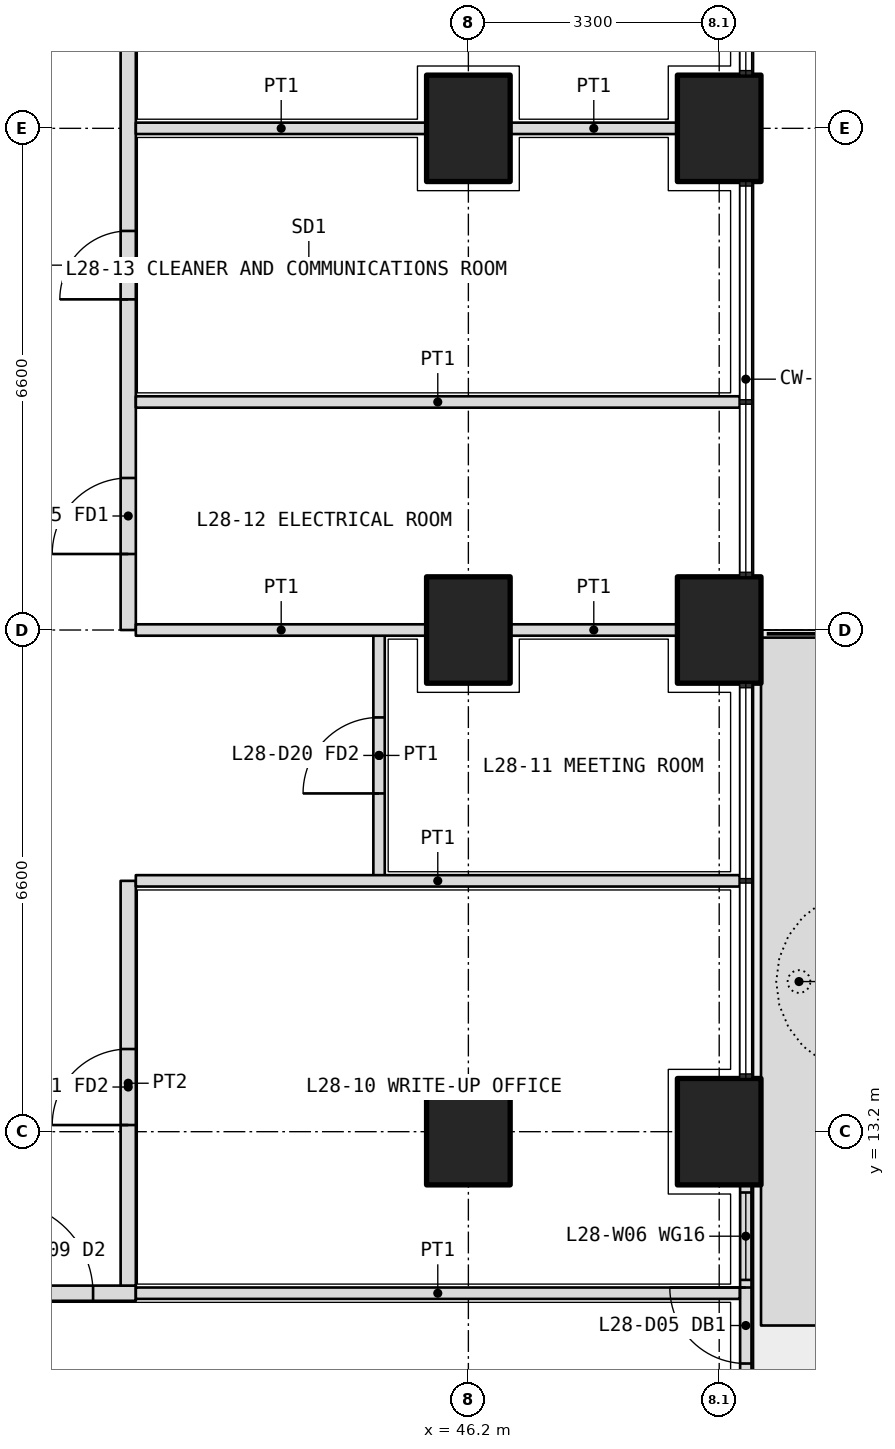
"""IFC4 building model, lengths in metres.
Left out: names, types, materials, properties, quantities, classifications, styles, units other than length and angle.
Written with IfcOpenShell. Run it as: python <this file> out.ifc"""

import sys

from ifc_helpers import new_model, si_unit, direction, frame, frame_2d, origin, origin_2d, place, context, subcontext, project, spatial, polyline, rectangle, outline, extrude, element, fill, save


model = new_model("IFC4")
c1 = context("Model", 3, precision=1e-05, world=origin(), true_north=direction((0.0, 1.0)))
c2 = subcontext(c1, "Body", "Model", "MODEL_VIEW")
j1 = project(units=[si_unit("LENGTHUNIT", "METRE"), si_unit("PLANEANGLEUNIT", "RADIAN")], contexts=[c1])
p1 = place(None, origin())
s1 = spatial("IfcSite", under=j1, at=p1, CompositionType="ELEMENT")
p2 = place(p1, origin())
s2 = spatial("IfcBuilding", under=s1, at=p2, CompositionType="ELEMENT")
p3 = place(p2, frame((0.0, 0.0, 124.2)))
s3 = spatial("IfcBuildingStorey", under=s2, at=p3, CompositionType="ELEMENT", Elevation=124.2)
for number, where, z_axis, x_axis in (
    (1, (49.5, 13.2, 0.0), (0.0, 0.0, 1.0), (0.0, 1.0, 0.0)),
    (2, (49.5, 19.8, 0.0), (0.0, 0.0, 1.0), (0.0, 1.0, 0.0)),
    (3, (49.5, 26.4, 0.0), (0.0, 0.0, 1.0), (0.0, 1.0, 0.0)),
    (4, (46.2, 13.2, 0.0), (0.0, 0.0, 1.0), (0.0, 1.0, 0.0)),
    (5, (46.2, 19.8, 0.0), (0.0, 0.0, 1.0), (0.0, 1.0, 0.0)),
    (6, (46.2, 26.4, 0.0), (0.0, 0.0, 1.0), (0.0, 1.0, 0.0)),
):
    element("IfcColumn", number, at=place(p3, frame(where, z_axis=z_axis, x_axis=x_axis)), inside=s3, PredefinedType="COLUMN", context=c2, shape_type="SweptSolid", body=[
        extrude(rectangle(XDim=1.4, YDim=1.1, at=origin_2d()), origin(), (0.0, 0.0, 1.0), 4.2),
    ])
p4 = place(p3, origin())
e7 = element("IfcWall", 7, at=p4, inside=s3, PredefinedType="USERDEFINED", context=c2, shape_type="SweptSolid", body=[
    extrude(outline(polyline([(50.05, 10.65), (51.05, 10.65), (51.05, 19.7), (50.05, 19.7), (50.05, 10.65)]), holes=[polyline([(50.2, 10.8), (50.9, 10.8), (50.9, 19.55), (50.2, 19.55), (50.2, 10.8)])]), origin(), (0.0, 0.0, 1.0), 1.05),
])
p5 = place(p3, frame((49.85, 7.3, 0.0), z_axis=(0.0, 0.0, 1.0), x_axis=(0.0, 1.0, 0.0)))
e8 = element("IfcWall", 8, at=p5, inside=s3, PredefinedType="SOLIDWALL", context=c2, shape_type="SweptSolid", body=[
    extrude(rectangle(XDim=5.2, YDim=0.15, at=frame_2d((2.6, 0.0))), origin(), (0.0, 0.0, 1.0), 2.7),
])
p6 = place(p5, frame((2.85, 0.0, 0.0)))
e9 = element("IfcOpeningElement", 9, at=p6, cuts=e8, PredefinedType="OPENING", context=c2, shape_type="SweptSolid", body=[
    extrude(rectangle(XDim=1.0, YDim=2.4, at=frame_2d((0.5, 1.2))), frame((0.0, 0.085, 0.0), z_axis=(0.0, -1.0, 0.0), x_axis=(1.0, 0.0, 0.0)), (0.0, 0.0, 1.0), 0.17),
])
p7 = place(p5, frame((0.1, 0.0, 0.1)))
e10 = element("IfcOpeningElement", 10, at=p7, cuts=e8, PredefinedType="OPENING", context=c2, shape_type="SweptSolid", body=[
    extrude(rectangle(XDim=2.25, YDim=2.3, at=frame_2d((1.125, 1.15))), frame((0.0, 0.085, 0.0), z_axis=(0.0, -1.0, 0.0), x_axis=(1.0, 0.0, 0.0)), (0.0, 0.0, 1.0), 0.17),
])
p8 = place(p5, frame((3.95, 0.0, 0.1)))
e11 = element("IfcOpeningElement", 11, at=p8, cuts=e8, PredefinedType="OPENING", context=c2, shape_type="SweptSolid", body=[
    extrude(rectangle(XDim=1.15, YDim=2.3, at=frame_2d((0.575, 1.15))), frame((0.0, 0.085, 0.0), z_axis=(0.0, -1.0, 0.0), x_axis=(1.0, 0.0, 0.0)), (0.0, 0.0, 1.0), 0.17),
])
p9 = place(p3, frame((10.975, 11.075, 0.0), z_axis=(0.0, 0.0, 1.0), x_axis=(1.0, 0.0, 0.0)))
e12 = element("IfcWall", 12, at=p9, inside=s3, PredefinedType="PARTITIONING", context=c2, shape_type="SweptSolid", body=[
    extrude(rectangle(XDim=30.85, YDim=0.2, at=frame_2d((15.425, 0.0))), origin(), (0.0, 0.0, 1.0), 2.85),
])
p10 = place(p9, frame((10.462, 0.0, 0.0)))
e13 = element("IfcOpeningElement", 13, at=p10, cuts=e12, PredefinedType="OPENING", context=c2, shape_type="SweptSolid", body=[
    extrude(rectangle(XDim=1.2, YDim=2.1, at=frame_2d((0.6, 1.05))), frame((0.0, 0.11, 0.0), z_axis=(0.0, -1.0, 0.0), x_axis=(1.0, 0.0, 0.0)), (0.0, 0.0, 1.0), 0.22),
])
p11 = place(p9, frame((23.625, 0.0, 0.0)))
e14 = element("IfcOpeningElement", 14, at=p11, cuts=e12, PredefinedType="OPENING", context=c2, shape_type="SweptSolid", body=[
    extrude(rectangle(XDim=1.0, YDim=2.1, at=frame_2d((0.5, 1.05))), frame((0.0, 0.11, 0.0), z_axis=(0.0, -1.0, 0.0), x_axis=(1.0, 0.0, 0.0)), (0.0, 0.0, 1.0), 0.22),
])
p12 = place(p9, frame((26.925, 0.0, 0.0)))
e15 = element("IfcOpeningElement", 15, at=p12, cuts=e12, PredefinedType="OPENING", context=c2, shape_type="SweptSolid", body=[
    extrude(rectangle(XDim=1.0, YDim=2.1, at=frame_2d((0.5, 1.05))), frame((0.0, 0.11, 0.0), z_axis=(0.0, -1.0, 0.0), x_axis=(1.0, 0.0, 0.0)), (0.0, 0.0, 1.0), 0.22),
])
p13 = place(p9, frame((29.087, 0.0, 0.0)))
e16 = element("IfcOpeningElement", 16, at=p13, cuts=e12, PredefinedType="OPENING", context=c2, shape_type="SweptSolid", body=[
    extrude(rectangle(XDim=1.2, YDim=2.1, at=frame_2d((0.6, 1.05))), frame((0.0, 0.11, 0.0), z_axis=(0.0, -1.0, 0.0), x_axis=(1.0, 0.0, 0.0)), (0.0, 0.0, 1.0), 0.22),
])
p14 = place(p3, frame((41.725, 11.175, 0.0), z_axis=(0.0, 0.0, 1.0), x_axis=(0.0, 1.0, 0.0)))
e17 = element("IfcWall", 17, at=p14, inside=s3, PredefinedType="PARTITIONING", context=c2, shape_type="SweptSolid", body=[
    extrude(rectangle(XDim=5.325, YDim=0.2, at=frame_2d((2.663, 0.0))), origin(), (0.0, 0.0, 1.0), 2.85),
])
p15 = place(p14, frame((2.113, 0.0, 0.0)))
e18 = element("IfcOpeningElement", 18, at=p15, cuts=e17, PredefinedType="OPENING", context=c2, shape_type="SweptSolid", body=[
    extrude(rectangle(XDim=1.0, YDim=2.1, at=frame_2d((0.5, 1.05))), frame((0.0, 0.11, 0.0), z_axis=(0.0, -1.0, 0.0), x_axis=(1.0, 0.0, 0.0)), (0.0, 0.0, 1.0), 0.22),
])
p16 = place(p3, frame((41.725, 19.8, 0.0), z_axis=(0.0, 0.0, 1.0), x_axis=(0.0, 1.0, 0.0)))
e19 = element("IfcWall", 19, at=p16, inside=s3, PredefinedType="PARTITIONING", context=c2, shape_type="SweptSolid", body=[
    extrude(rectangle(XDim=19.0, YDim=0.2, at=frame_2d((9.5, 0.0))), origin(), (0.0, 0.0, 1.0), 2.85),
])
p17 = place(p16, frame((1.0, 0.0, 0.0)))
e20 = element("IfcOpeningElement", 20, at=p17, cuts=e19, PredefinedType="OPENING", context=c2, shape_type="SweptSolid", body=[
    extrude(rectangle(XDim=1.0, YDim=2.1, at=frame_2d((0.5, 1.05))), frame((0.0, 0.11, 0.0), z_axis=(0.0, -1.0, 0.0), x_axis=(1.0, 0.0, 0.0)), (0.0, 0.0, 1.0), 0.22),
])
p18 = place(p16, frame((4.35, 0.0, 0.0)))
e21 = element("IfcOpeningElement", 21, at=p18, cuts=e19, PredefinedType="OPENING", context=c2, shape_type="SweptSolid", body=[
    extrude(rectangle(XDim=0.9, YDim=2.1, at=frame_2d((0.45, 1.05))), frame((0.0, 0.11, 0.0), z_axis=(0.0, -1.0, 0.0), x_axis=(1.0, 0.0, 0.0)), (0.0, 0.0, 1.0), 0.22),
])
p19 = place(p16, frame((7.75, 0.0, 0.0)))
e22 = element("IfcOpeningElement", 22, at=p19, cuts=e19, PredefinedType="OPENING", context=c2, shape_type="SweptSolid", body=[
    extrude(rectangle(XDim=1.0, YDim=2.1, at=frame_2d((0.5, 1.05))), frame((0.0, 0.11, 0.0), z_axis=(0.0, -1.0, 0.0), x_axis=(1.0, 0.0, 0.0)), (0.0, 0.0, 1.0), 0.22),
])
p20 = place(p16, frame((14.0, 0.0, 0.0)))
e23 = element("IfcOpeningElement", 23, at=p20, cuts=e19, PredefinedType="OPENING", context=c2, shape_type="SweptSolid", body=[
    extrude(rectangle(XDim=1.0, YDim=2.1, at=frame_2d((0.5, 1.05))), frame((0.0, 0.11, 0.0), z_axis=(0.0, -1.0, 0.0), x_axis=(1.0, 0.0, 0.0)), (0.0, 0.0, 1.0), 0.22),
])
p21 = place(p3, frame((49.77, 11.075, 0.0), z_axis=(0.0, 0.0, 1.0), x_axis=(-1.0, 0.0, 0.0)))
e24 = element("IfcWall", 24, at=p21, inside=s3, PredefinedType="PARTITIONING", context=c2, shape_type="SweptSolid", body=[
    extrude(rectangle(XDim=7.945, YDim=0.15, at=frame_2d((3.973, 0.0))), origin(), (0.0, 0.0, 1.0), 2.7),
])
p22 = place(p3, frame((45.025, 16.5, 0.0), z_axis=(0.0, 0.0, 1.0), x_axis=(0.0, 1.0, 0.0)))
e25 = element("IfcWall", 25, at=p22, inside=s3, PredefinedType="PARTITIONING", context=c2, shape_type="SweptSolid", body=[
    extrude(rectangle(XDim=3.3, YDim=0.15, at=frame_2d((1.65, 0.0))), origin(), (0.0, 0.0, 1.0), 2.85),
])
p23 = place(p22, frame((1.15, 0.0, 0.0)))
e26 = element("IfcOpeningElement", 26, at=p23, cuts=e25, PredefinedType="OPENING", context=c2, shape_type="SweptSolid", body=[
    extrude(rectangle(XDim=1.0, YDim=2.1, at=frame_2d((0.5, 1.05))), frame((0.0, 0.085, 0.0), z_axis=(0.0, -1.0, 0.0), x_axis=(1.0, 0.0, 0.0)), (0.0, 0.0, 1.0), 0.17),
])
p24 = place(p3, frame((49.77, 22.8, 0.0), z_axis=(0.0, 0.0, 1.0), x_axis=(-1.0, 0.0, 0.0)))
e27 = element("IfcWall", 27, at=p24, inside=s3, PredefinedType="PARTITIONING", context=c2, shape_type="SweptSolid", body=[
    extrude(rectangle(XDim=7.945, YDim=0.15, at=frame_2d((3.973, 0.0))), origin(), (0.0, 0.0, 1.0), 2.7),
])
p25 = place(p3, frame((48.95, 26.4, 0.0), z_axis=(0.0, 0.0, 1.0), x_axis=(-1.0, 0.0, 0.0)))
e28 = element("IfcWall", 28, at=p25, inside=s3, PredefinedType="PARTITIONING", context=c2, shape_type="SweptSolid", body=[
    extrude(rectangle(XDim=2.2, YDim=0.15, at=frame_2d((1.1, 0.0))), origin(), (0.0, 0.0, 1.0), 2.85),
])
p26 = place(p3, frame((45.65, 26.4, 0.0), z_axis=(0.0, 0.0, 1.0), x_axis=(-1.0, 0.0, 0.0)))
e29 = element("IfcWall", 29, at=p26, inside=s3, PredefinedType="PARTITIONING", context=c2, shape_type="SweptSolid", body=[
    extrude(rectangle(XDim=3.825, YDim=0.15, at=frame_2d((1.913, 0.0))), origin(), (0.0, 0.0, 1.0), 2.85),
])
p27 = place(p3, frame((49.77, 16.5, 0.0), z_axis=(0.0, 0.0, 1.0), x_axis=(-1.0, 0.0, 0.0)))
e30 = element("IfcWall", 30, at=p27, inside=s3, PredefinedType="PARTITIONING", context=c2, shape_type="SweptSolid", body=[
    extrude(rectangle(XDim=7.945, YDim=0.15, at=frame_2d((3.973, 0.0))), origin(), (0.0, 0.0, 1.0), 2.7),
])
p28 = place(p3, frame((48.95, 19.8, 0.0), z_axis=(0.0, 0.0, 1.0), x_axis=(-1.0, 0.0, 0.0)))
e31 = element("IfcWall", 31, at=p28, inside=s3, PredefinedType="PARTITIONING", context=c2, shape_type="SweptSolid", body=[
    extrude(rectangle(XDim=2.2, YDim=0.15, at=frame_2d((1.1, 0.0))), origin(), (0.0, 0.0, 1.0), 2.85),
])
p29 = place(p3, frame((45.65, 19.8, 0.0), z_axis=(0.0, 0.0, 1.0), x_axis=(-1.0, 0.0, 0.0)))
e32 = element("IfcWall", 32, at=p29, inside=s3, PredefinedType="PARTITIONING", context=c2, shape_type="SweptSolid", body=[
    extrude(rectangle(XDim=3.825, YDim=0.15, at=frame_2d((1.913, 0.0))), origin(), (0.0, 0.0, 1.0), 2.85),
])
p30 = place(p6, origin())
e33 = element("IfcDoor", 33, at=p30, inside=s3, OperationType="SINGLE_SWING_RIGHT", PredefinedType="DOOR", context=c2, shape_type="SweptSolid", body=[
    extrude(rectangle(XDim=1.0, YDim=2.4, at=frame_2d((0.5, 1.2))), frame((0.0, 0.025, 0.0), z_axis=(0.0, -1.0, 0.0), x_axis=(1.0, 0.0, 0.0)), (0.0, 0.0, 1.0), 0.05),
])
fill(e9, e33)
p31 = place(p8, origin())
e34 = element("IfcWindow", 34, at=p31, inside=s3, PartitioningType="SINGLE_PANEL", PredefinedType="WINDOW", context=c2, shape_type="SweptSolid", body=[
    extrude(rectangle(XDim=1.15, YDim=2.3, at=frame_2d((0.575, 1.15))), frame((0.0, 0.03, 0.0), z_axis=(0.0, -1.0, 0.0), x_axis=(1.0, 0.0, 0.0)), (0.0, 0.0, 1.0), 0.06),
])
fill(e11, e34)
p32 = place(p13, origin())
e35 = element("IfcDoor", 35, at=p32, inside=s3, OperationType="DOUBLE_DOOR_SINGLE_SWING", PredefinedType="DOOR", context=c2, shape_type="SweptSolid", body=[
    extrude(rectangle(XDim=1.2, YDim=2.1, at=frame_2d((0.6, 1.05))), frame((0.0, 0.025, 0.0), z_axis=(0.0, -1.0, 0.0), x_axis=(1.0, 0.0, 0.0)), (0.0, 0.0, 1.0), 0.05),
])
fill(e16, e35)
p33 = place(p15, origin())
e36 = element("IfcDoor", 36, at=p33, inside=s3, OperationType="SINGLE_SWING_LEFT", PredefinedType="DOOR", context=c2, shape_type="SweptSolid", body=[
    extrude(rectangle(XDim=1.0, YDim=2.1, at=frame_2d((0.5, 1.05))), frame((0.0, 0.025, 0.0), z_axis=(0.0, -1.0, 0.0), x_axis=(1.0, 0.0, 0.0)), (0.0, 0.0, 1.0), 0.05),
])
fill(e18, e36)
p34 = place(p23, origin())
e37 = element("IfcDoor", 37, at=p34, inside=s3, OperationType="SINGLE_SWING_LEFT", PredefinedType="DOOR", context=c2, shape_type="SweptSolid", body=[
    extrude(rectangle(XDim=1.0, YDim=2.1, at=frame_2d((0.5, 1.05))), frame((0.0, 0.025, 0.0), z_axis=(0.0, -1.0, 0.0), x_axis=(1.0, 0.0, 0.0)), (0.0, 0.0, 1.0), 0.05),
])
fill(e26, e37)
p35 = place(p17, origin())
e38 = element("IfcDoor", 38, at=p35, inside=s3, OperationType="SINGLE_SWING_LEFT", PredefinedType="DOOR", context=c2, shape_type="SweptSolid", body=[
    extrude(rectangle(XDim=1.0, YDim=2.1, at=frame_2d((0.5, 1.05))), frame((0.0, 0.025, 0.0), z_axis=(0.0, -1.0, 0.0), x_axis=(1.0, 0.0, 0.0)), (0.0, 0.0, 1.0), 0.05),
])
fill(e20, e38)
p36 = place(p18, origin())
e39 = element("IfcDoor", 39, at=p36, inside=s3, OperationType="SINGLE_SWING_LEFT", PredefinedType="DOOR", context=c2, shape_type="SweptSolid", body=[
    extrude(rectangle(XDim=0.9, YDim=2.1, at=frame_2d((0.45, 1.05))), frame((0.0, 0.025, 0.0), z_axis=(0.0, -1.0, 0.0), x_axis=(1.0, 0.0, 0.0)), (0.0, 0.0, 1.0), 0.05),
])
fill(e21, e39)
save(model, sys.argv[1])
